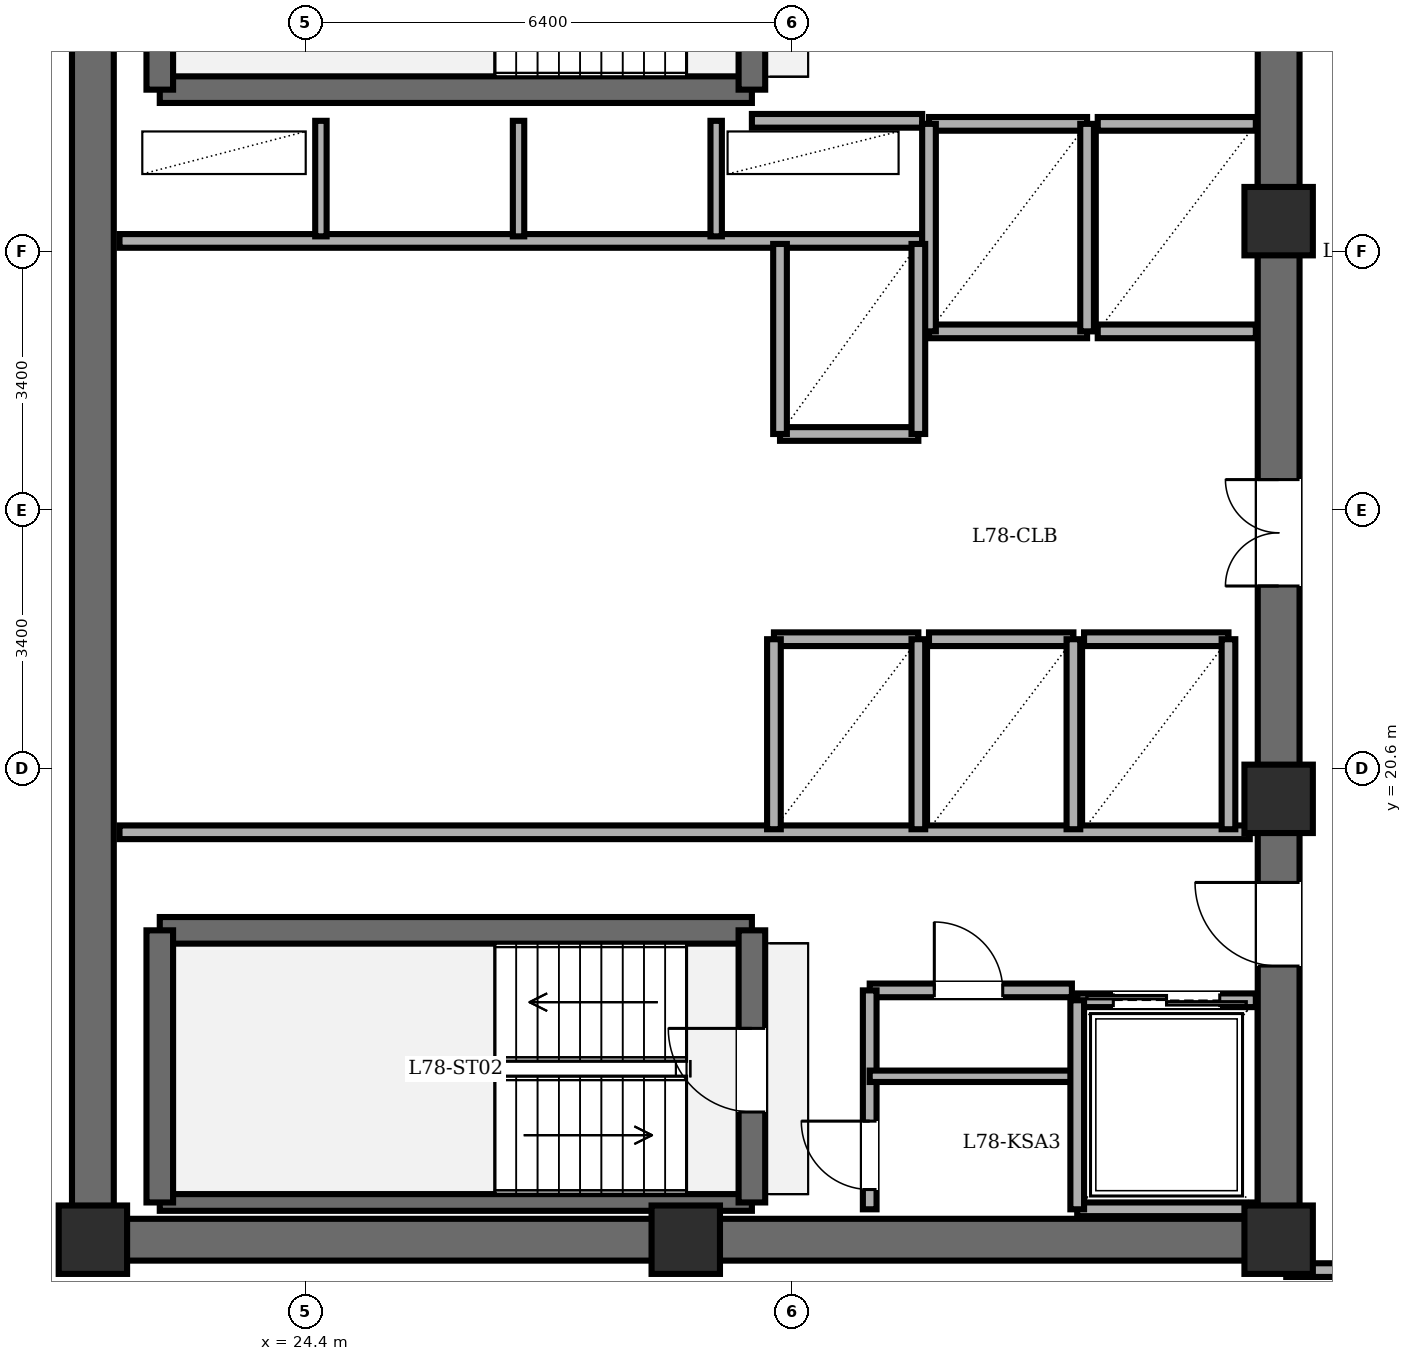
"""IFC4 building model, lengths in metres.
Left out: names, types, materials, properties, quantities, classifications, styles, units other than length and angle.
Written with IfcOpenShell. Run it as: python <this file> out.ifc"""

import sys

from ifc_helpers import new_model, si_unit, direction, frame, frame_2d, origin, origin_2d, place, context, subcontext, project, spatial, rectangle, extrude, element, fill, save


model = new_model("IFC4")
c1 = context("Model", 3, precision=1e-05, world=origin(), true_north=direction((0.0, 1.0)))
c2 = subcontext(c1, "Body", "Model", "MODEL_VIEW")
j1 = project(units=[si_unit("LENGTHUNIT", "METRE"), si_unit("PLANEANGLEUNIT", "RADIAN")], contexts=[c1])
p1 = place(None, origin())
s1 = spatial("IfcSite", under=j1, at=p1, CompositionType="ELEMENT")
p2 = place(p1, origin())
s2 = spatial("IfcBuilding", under=s1, at=p2, CompositionType="ELEMENT")
p3 = place(p2, frame((0.0, 0.0, 300.4)))
s3 = spatial("IfcBuildingStorey", under=s2, at=p3, CompositionType="ELEMENT", Elevation=300.4)
for number, where, z_axis, x_axis in (
    (1, (21.6, 14.4, 0.0), (0.0, 0.0, 1.0), (1.0, 0.0, 0.0)),
    (2, (29.4, 14.4, 0.0), (0.0, 0.0, 1.0), (1.0, 0.0, 0.0)),
    (3, (37.2, 14.4, 0.0), (0.0, 0.0, 1.0), (1.0, 0.0, 0.0)),
    (4, (37.2, 20.2, 0.0), (0.0, 0.0, 1.0), (1.0, 0.0, 0.0)),
    (5, (37.2, 27.8, 0.0), (0.0, 0.0, 1.0), (1.0, 0.0, 0.0)),
):
    element("IfcColumn", number, at=place(p3, frame(where, z_axis=z_axis, x_axis=x_axis)), inside=s3, PredefinedType="COLUMN", context=c2, shape_type="SweptSolid", body=[
        extrude(rectangle(XDim=0.9, YDim=0.9, at=origin_2d()), origin(), (0.0, 0.0, 1.0), 7.6),
    ])
p4 = place(p3, frame((21.6, 14.4, 0.0), z_axis=(0.0, 0.0, 1.0), x_axis=(0.0, 1.0, 0.0)))
e6 = element("IfcWall", 6, at=p4, inside=s3, PredefinedType="SHEAR", context=c2, shape_type="SweptSolid", body=[
    extrude(rectangle(XDim=19.2, YDim=0.55, at=frame_2d((9.6, 0.0))), origin(), (0.0, 0.0, 1.0), 7.38),
])
p5 = place(p3, frame((37.2, 14.4, 0.0), z_axis=(0.0, 0.0, 1.0), x_axis=(-1.0, 0.0, 0.0)))
e7 = element("IfcWall", 7, at=p5, inside=s3, PredefinedType="SHEAR", context=c2, shape_type="SweptSolid", body=[
    extrude(rectangle(XDim=15.6, YDim=0.55, at=frame_2d((7.8, 0.0))), origin(), (0.0, 0.0, 1.0), 7.38),
])
p6 = place(p3, frame((37.2, 14.4, 0.0), z_axis=(0.0, 0.0, 1.0), x_axis=(0.0, 1.0, 0.0)))
e8 = element("IfcWall", 8, at=p6, inside=s3, PredefinedType="SHEAR", context=c2, shape_type="SweptSolid", body=[
    extrude(rectangle(XDim=19.2, YDim=0.55, at=frame_2d((9.6, 0.0))), origin(), (0.0, 0.0, 1.0), 7.38),
])
p7 = place(p6, frame((15.8, 0.0, 0.0)))
e9 = element("IfcOpeningElement", 9, at=p7, cuts=e8, PredefinedType="OPENING", context=c2, shape_type="SweptSolid", body=[
    extrude(rectangle(XDim=1.15, YDim=2.15, at=frame_2d((0.575, 1.075))), frame((0.0, 0.285, 0.0), z_axis=(0.0, -1.0, 0.0), x_axis=(1.0, 0.0, 0.0)), (0.0, 0.0, 1.0), 0.57),
])
p8 = place(p6, frame((3.6, 0.0, 0.0)))
e10 = element("IfcOpeningElement", 10, at=p8, cuts=e8, PredefinedType="OPENING", context=c2, shape_type="SweptSolid", body=[
    extrude(rectangle(XDim=1.1, YDim=2.15, at=frame_2d((0.55, 1.075))), frame((0.0, 0.285, 0.0), z_axis=(0.0, -1.0, 0.0), x_axis=(1.0, 0.0, 0.0)), (0.0, 0.0, 1.0), 0.57),
])
p9 = place(p6, frame((8.6, 0.0, 0.0)))
e11 = element("IfcOpeningElement", 11, at=p9, cuts=e8, PredefinedType="OPENING", context=c2, shape_type="SweptSolid", body=[
    extrude(rectangle(XDim=1.4, YDim=2.25, at=frame_2d((0.7, 1.125))), frame((0.0, 0.285, 0.0), z_axis=(0.0, -1.0, 0.0), x_axis=(1.0, 0.0, 0.0)), (0.0, 0.0, 1.0), 0.57),
])
p10 = place(p3, frame((22.48, 29.53, 0.0), z_axis=(0.0, 0.0, 1.0), x_axis=(1.0, 0.0, 0.0)))
e12 = element("IfcWall", 12, at=p10, inside=s3, PredefinedType="SOLIDWALL", context=c2, shape_type="SweptSolid", body=[
    extrude(rectangle(XDim=7.79, YDim=0.35, at=frame_2d((3.895, 0.0))), origin(), (0.0, 0.0, 1.0), 7.38),
])
p11 = place(p3, frame((22.48, 29.53, 0.0), z_axis=(0.0, 0.0, 1.0), x_axis=(0.0, 1.0, 0.0)))
e13 = element("IfcWall", 13, at=p11, inside=s3, PredefinedType="SOLIDWALL", context=c2, shape_type="SweptSolid", body=[
    extrude(rectangle(XDim=3.58, YDim=0.35, at=frame_2d((1.79, 0.0))), origin(), (0.0, 0.0, 1.0), 7.38),
])
p12 = place(p3, frame((30.27, 29.53, 0.0), z_axis=(0.0, 0.0, 1.0), x_axis=(0.0, 1.0, 0.0)))
e14 = element("IfcWall", 14, at=p12, inside=s3, PredefinedType="SOLIDWALL", context=c2, shape_type="SweptSolid", body=[
    extrude(rectangle(XDim=3.58, YDim=0.35, at=frame_2d((1.79, 0.0))), origin(), (0.0, 0.0, 1.0), 7.38),
])
p13 = place(p12, frame((1.25, 0.0, 0.0)))
e15 = element("IfcOpeningElement", 15, at=p13, cuts=e14, PredefinedType="OPENING", context=c2, shape_type="SweptSolid", body=[
    extrude(rectangle(XDim=1.1, YDim=2.15, at=frame_2d((0.55, 1.075))), frame((0.0, 0.185, 0.0), z_axis=(0.0, -1.0, 0.0), x_axis=(1.0, 0.0, 0.0)), (0.0, 0.0, 1.0), 0.37),
])
p14 = place(p3, frame((22.48, 18.47, 0.0), z_axis=(0.0, 0.0, 1.0), x_axis=(1.0, 0.0, 0.0)))
e16 = element("IfcWall", 16, at=p14, inside=s3, PredefinedType="SOLIDWALL", context=c2, shape_type="SweptSolid", body=[
    extrude(rectangle(XDim=7.79, YDim=0.35, at=frame_2d((3.895, 0.0))), origin(), (0.0, 0.0, 1.0), 7.38),
])
p15 = place(p3, frame((22.48, 14.89, 0.0), z_axis=(0.0, 0.0, 1.0), x_axis=(1.0, 0.0, 0.0)))
e17 = element("IfcWall", 17, at=p15, inside=s3, PredefinedType="PARTITIONING", context=c2, shape_type="SweptSolid", body=[
    extrude(rectangle(XDim=7.79, YDim=0.22, at=frame_2d((3.895, 0.0))), origin(), (0.0, 0.0, 1.0), 7.38),
])
p16 = place(p3, frame((22.48, 14.89, 0.0), z_axis=(0.0, 0.0, 1.0), x_axis=(0.0, 1.0, 0.0)))
e18 = element("IfcWall", 18, at=p16, inside=s3, PredefinedType="SOLIDWALL", context=c2, shape_type="SweptSolid", body=[
    extrude(rectangle(XDim=3.58, YDim=0.35, at=frame_2d((1.79, 0.0))), origin(), (0.0, 0.0, 1.0), 7.38),
])
p17 = place(p3, frame((30.27, 14.89, 0.0), z_axis=(0.0, 0.0, 1.0), x_axis=(0.0, 1.0, 0.0)))
e19 = element("IfcWall", 19, at=p17, inside=s3, PredefinedType="SOLIDWALL", context=c2, shape_type="SweptSolid", body=[
    extrude(rectangle(XDim=3.58, YDim=0.35, at=frame_2d((1.79, 0.0))), origin(), (0.0, 0.0, 1.0), 7.38),
])
p18 = place(p17, frame((1.19, 0.0, 0.0)))
e20 = element("IfcOpeningElement", 20, at=p18, cuts=e19, PredefinedType="OPENING", context=c2, shape_type="SweptSolid", body=[
    extrude(rectangle(XDim=1.1, YDim=2.15, at=frame_2d((0.55, 1.075))), frame((0.0, 0.185, 0.0), z_axis=(0.0, -1.0, 0.0), x_axis=(1.0, 0.0, 0.0)), (0.0, 0.0, 1.0), 0.37),
])
p19 = place(p3, frame((30.27, 29.12, 0.0), z_axis=(0.0, 0.0, 1.0), x_axis=(1.0, 0.0, 0.0)))
e21 = element("IfcWall", 21, at=p19, inside=s3, PredefinedType="PARTITIONING", context=c2, shape_type="SweptSolid", body=[
    extrude(rectangle(XDim=2.24, YDim=0.18, at=frame_2d((1.12, 0.0))), origin(), (0.0, 0.0, 1.0), 7.38),
])
p20 = place(p3, frame((21.95, 27.54, 0.0), z_axis=(0.0, 0.0, 1.0), x_axis=(1.0, 0.0, 0.0)))
e22 = element("IfcWall", 22, at=p20, inside=s3, PredefinedType="PARTITIONING", context=c2, shape_type="SweptSolid", body=[
    extrude(rectangle(XDim=10.56, YDim=0.18, at=frame_2d((5.28, 0.0))), origin(), (0.0, 0.0, 1.0), 7.38),
])
for number, where, z_axis, x_axis in (
    (23, (24.6, 27.6, 0.0), (0.0, 0.0, 1.0), (0.0, 1.0, 0.0)),
    (24, (27.2, 27.6, 0.0), (0.0, 0.0, 1.0), (0.0, 1.0, 0.0)),
    (25, (29.8, 27.6, 0.0), (0.0, 0.0, 1.0), (0.0, 1.0, 0.0)),
):
    element("IfcWall", number, at=place(p3, frame(where, z_axis=z_axis, x_axis=x_axis)), inside=s3, PredefinedType="PARTITIONING", context=c2, shape_type="SweptSolid", body=[
        extrude(rectangle(XDim=1.52, YDim=0.15, at=frame_2d((0.76, 0.0))), origin(), (0.0, 0.0, 1.0), 7.38),
    ])
p21 = place(p3, frame((21.95, 19.76, 0.0), z_axis=(0.0, 0.0, 1.0), x_axis=(1.0, 0.0, 0.0)))
e26 = element("IfcWall", 26, at=p21, inside=s3, PredefinedType="PARTITIONING", context=c2, shape_type="SweptSolid", body=[
    extrude(rectangle(XDim=14.87, YDim=0.18, at=frame_2d((7.435, 0.0))), origin(), (0.0, 0.0, 1.0), 7.38),
])
p22 = place(p3, frame((31.82, 17.68, 0.0), z_axis=(0.0, 0.0, 1.0), x_axis=(1.0, 0.0, 0.0)))
e27 = element("IfcWall", 27, at=p22, inside=s3, PredefinedType="PARTITIONING", context=c2, shape_type="SweptSolid", body=[
    extrude(rectangle(XDim=2.66, YDim=0.18, at=frame_2d((1.33, 0.0))), origin(), (0.0, 0.0, 1.0), 7.38),
])
p23 = place(p22, frame((0.85, 0.0, 0.0)))
e28 = element("IfcOpeningElement", 28, at=p23, cuts=e27, PredefinedType="OPENING", context=c2, shape_type="SweptSolid", body=[
    extrude(rectangle(XDim=0.9, YDim=2.05, at=frame_2d((0.45, 1.025))), frame((0.0, 0.1, 0.0), z_axis=(0.0, -1.0, 0.0), x_axis=(1.0, 0.0, 0.0)), (0.0, 0.0, 1.0), 0.2),
])
p24 = place(p3, frame((31.82, 14.8, 0.0), z_axis=(0.0, 0.0, 1.0), x_axis=(0.0, 1.0, 0.0)))
e29 = element("IfcWall", 29, at=p24, inside=s3, PredefinedType="PARTITIONING", context=c2, shape_type="SweptSolid", body=[
    extrude(rectangle(XDim=2.88, YDim=0.18, at=frame_2d((1.44, 0.0))), origin(), (0.0, 0.0, 1.0), 7.38),
])
p25 = place(p24, frame((0.26, 0.0, 0.0)))
e30 = element("IfcOpeningElement", 30, at=p25, cuts=e29, PredefinedType="OPENING", context=c2, shape_type="SweptSolid", body=[
    extrude(rectangle(XDim=0.9, YDim=2.05, at=frame_2d((0.45, 1.025))), frame((0.0, 0.1, 0.0), z_axis=(0.0, -1.0, 0.0), x_axis=(1.0, 0.0, 0.0)), (0.0, 0.0, 1.0), 0.2),
])
p26 = place(p3, frame((31.82, 16.55, 0.0), z_axis=(0.0, 0.0, 1.0), x_axis=(1.0, 0.0, 0.0)))
e31 = element("IfcWall", 31, at=p26, inside=s3, PredefinedType="PARTITIONING", context=c2, shape_type="SweptSolid", body=[
    extrude(rectangle(XDim=2.66, YDim=0.15, at=frame_2d((1.33, 0.0))), origin(), (0.0, 0.0, 1.0), 7.38),
])
for number, where, z_axis, x_axis in (
    (32, (32.6, 29.08, 0.0), (0.0, 0.0, 1.0), (1.0, 0.0, 0.0)),
    (33, (34.68, 26.35, 0.0), (0.0, 0.0, 1.0), (-1.0, 0.0, 0.0)),
):
    element("IfcWall", number, at=place(p3, frame(where, z_axis=z_axis, x_axis=x_axis)), inside=s3, PredefinedType="PARTITIONING", context=c2, shape_type="SweptSolid", body=[
        extrude(rectangle(XDim=2.08, YDim=0.18, at=frame_2d((1.04, 0.0))), origin(), (0.0, 0.0, 1.0), 7.38),
    ])
for number, where, z_axis, x_axis in (
    (34, (34.68, 26.35, 0.0), (0.0, 0.0, 1.0), (0.0, 1.0, 0.0)),
    (35, (32.6, 29.08, 0.0), (0.0, 0.0, 1.0), (0.0, -1.0, 0.0)),
):
    element("IfcWall", number, at=place(p3, frame(where, z_axis=z_axis, x_axis=x_axis)), inside=s3, PredefinedType="PARTITIONING", context=c2, shape_type="SweptSolid", body=[
        extrude(rectangle(XDim=2.73, YDim=0.18, at=frame_2d((1.365, 0.0))), origin(), (0.0, 0.0, 1.0), 7.38),
    ])
for number, where, z_axis, x_axis in (
    (36, (34.82, 29.08, 0.0), (0.0, 0.0, 1.0), (1.0, 0.0, 0.0)),
    (37, (36.9, 26.35, 0.0), (0.0, 0.0, 1.0), (-1.0, 0.0, 0.0)),
):
    element("IfcWall", number, at=place(p3, frame(where, z_axis=z_axis, x_axis=x_axis)), inside=s3, PredefinedType="PARTITIONING", context=c2, shape_type="SweptSolid", body=[
        extrude(rectangle(XDim=2.08, YDim=0.18, at=frame_2d((1.04, 0.0))), origin(), (0.0, 0.0, 1.0), 7.38),
    ])
p27 = place(p3, frame((34.55, 17.55, 0.0), z_axis=(0.0, 0.0, 1.0), x_axis=(1.0, 0.0, 0.0)))
e38 = element("IfcWall", 38, at=p27, inside=s3, PredefinedType="PARTITIONING", context=c2, shape_type="SweptSolid", body=[
    extrude(rectangle(XDim=2.35, YDim=0.18, at=frame_2d((1.175, 0.0))), origin(), (0.0, 0.0, 1.0), 7.38),
])
p28 = place(p27, frame((0.475, 0.0, 0.0)))
e39 = element("IfcOpeningElement", 39, at=p28, cuts=e38, PredefinedType="OPENING", context=c2, shape_type="SweptSolid", body=[
    extrude(rectangle(XDim=1.4, YDim=2.3, at=frame_2d((0.7, 1.15))), frame((0.0, 0.1, 0.0), z_axis=(0.0, -1.0, 0.0), x_axis=(1.0, 0.0, 0.0)), (0.0, 0.0, 1.0), 0.2),
])
p29 = place(p3, frame((36.9, 14.8, 0.0), z_axis=(0.0, 0.0, 1.0), x_axis=(-1.0, 0.0, 0.0)))
e40 = element("IfcWall", 40, at=p29, inside=s3, PredefinedType="PARTITIONING", context=c2, shape_type="SweptSolid", body=[
    extrude(rectangle(XDim=2.35, YDim=0.18, at=frame_2d((1.175, 0.0))), origin(), (0.0, 0.0, 1.0), 7.38),
])
p30 = place(p3, frame((34.55, 17.55, 0.0), z_axis=(0.0, 0.0, 1.0), x_axis=(0.0, -1.0, 0.0)))
e41 = element("IfcWall", 41, at=p30, inside=s3, PredefinedType="PARTITIONING", context=c2, shape_type="SweptSolid", body=[
    extrude(rectangle(XDim=2.75, YDim=0.18, at=frame_2d((1.375, 0.0))), origin(), (0.0, 0.0, 1.0), 7.38),
])
p31 = place(p3, frame((32.46, 25.0, 0.0), z_axis=(0.0, 0.0, 1.0), x_axis=(-1.0, 0.0, 0.0)))
e42 = element("IfcWall", 42, at=p31, inside=s3, PredefinedType="PARTITIONING", context=c2, shape_type="SweptSolid", body=[
    extrude(rectangle(XDim=1.82, YDim=0.18, at=frame_2d((0.91, 0.0))), origin(), (0.0, 0.0, 1.0), 7.38),
])
for number, where, z_axis, x_axis in (
    (43, (32.46, 25.0, 0.0), (0.0, 0.0, 1.0), (0.0, 1.0, 0.0)),
    (44, (30.64, 27.5, 0.0), (0.0, 0.0, 1.0), (0.0, -1.0, 0.0)),
):
    element("IfcWall", number, at=place(p3, frame(where, z_axis=z_axis, x_axis=x_axis)), inside=s3, PredefinedType="PARTITIONING", context=c2, shape_type="SweptSolid", body=[
        extrude(rectangle(XDim=2.5, YDim=0.18, at=frame_2d((1.25, 0.0))), origin(), (0.0, 0.0, 1.0), 7.38),
    ])
p32 = place(p3, frame((30.56, 22.3, 0.0), z_axis=(0.0, 0.0, 1.0), x_axis=(1.0, 0.0, 0.0)))
e45 = element("IfcWall", 45, at=p32, inside=s3, PredefinedType="PARTITIONING", context=c2, shape_type="SweptSolid", body=[
    extrude(rectangle(XDim=1.9, YDim=0.18, at=frame_2d((0.95, 0.0))), origin(), (0.0, 0.0, 1.0), 7.38),
])
for number, where, z_axis, x_axis in (
    (46, (32.46, 19.8, 0.0), (0.0, 0.0, 1.0), (0.0, 1.0, 0.0)),
    (47, (30.56, 22.3, 0.0), (0.0, 0.0, 1.0), (0.0, -1.0, 0.0)),
):
    element("IfcWall", number, at=place(p3, frame(where, z_axis=z_axis, x_axis=x_axis)), inside=s3, PredefinedType="PARTITIONING", context=c2, shape_type="SweptSolid", body=[
        extrude(rectangle(XDim=2.5, YDim=0.18, at=frame_2d((1.25, 0.0))), origin(), (0.0, 0.0, 1.0), 7.38),
    ])
p33 = place(p3, frame((32.6, 22.3, 0.0), z_axis=(0.0, 0.0, 1.0), x_axis=(1.0, 0.0, 0.0)))
e48 = element("IfcWall", 48, at=p33, inside=s3, PredefinedType="PARTITIONING", context=c2, shape_type="SweptSolid", body=[
    extrude(rectangle(XDim=1.9, YDim=0.18, at=frame_2d((0.95, 0.0))), origin(), (0.0, 0.0, 1.0), 7.38),
])
p34 = place(p3, frame((34.5, 19.8, 0.0), z_axis=(0.0, 0.0, 1.0), x_axis=(0.0, 1.0, 0.0)))
e49 = element("IfcWall", 49, at=p34, inside=s3, PredefinedType="PARTITIONING", context=c2, shape_type="SweptSolid", body=[
    extrude(rectangle(XDim=2.5, YDim=0.18, at=frame_2d((1.25, 0.0))), origin(), (0.0, 0.0, 1.0), 7.38),
])
p35 = place(p3, frame((34.64, 22.3, 0.0), z_axis=(0.0, 0.0, 1.0), x_axis=(1.0, 0.0, 0.0)))
e50 = element("IfcWall", 50, at=p35, inside=s3, PredefinedType="PARTITIONING", context=c2, shape_type="SweptSolid", body=[
    extrude(rectangle(XDim=1.9, YDim=0.18, at=frame_2d((0.95, 0.0))), origin(), (0.0, 0.0, 1.0), 7.38),
])
p36 = place(p3, frame((36.54, 19.8, 0.0), z_axis=(0.0, 0.0, 1.0), x_axis=(0.0, 1.0, 0.0)))
e51 = element("IfcWall", 51, at=p36, inside=s3, PredefinedType="PARTITIONING", context=c2, shape_type="SweptSolid", body=[
    extrude(rectangle(XDim=2.5, YDim=0.18, at=frame_2d((1.25, 0.0))), origin(), (0.0, 0.0, 1.0), 7.38),
])
p37 = place(p3, frame((37.3, 14.0, 0.0), z_axis=(0.0, 0.0, 1.0), x_axis=(1.0, 0.0, 0.0)))
e52 = element("IfcWall", 52, at=p37, inside=s3, PredefinedType="PARTITIONING", context=c2, shape_type="SweptSolid", body=[
    extrude(rectangle(XDim=2.1, YDim=0.18, at=frame_2d((1.05, 0.0))), origin(), (0.0, 0.0, 1.0), 7.38),
])
p38 = place(p18, origin())
e53 = element("IfcDoor", 53, at=p38, inside=s3, OperationType="SINGLE_SWING_RIGHT", PredefinedType="DOOR", context=c2, shape_type="SweptSolid", body=[
    extrude(rectangle(XDim=1.1, YDim=2.15, at=frame_2d((0.55, 1.075))), frame((0.0, 0.025, 0.0), z_axis=(0.0, -1.0, 0.0), x_axis=(1.0, 0.0, 0.0)), (0.0, 0.0, 1.0), 0.05),
])
fill(e20, e53)
p39 = place(p8, origin())
e54 = element("IfcDoor", 54, at=p39, inside=s3, OperationType="SINGLE_SWING_RIGHT", PredefinedType="DOOR", context=c2, shape_type="SweptSolid", body=[
    extrude(rectangle(XDim=1.1, YDim=2.15, at=frame_2d((0.55, 1.075))), frame((0.0, 0.025, 0.0), z_axis=(0.0, -1.0, 0.0), x_axis=(1.0, 0.0, 0.0)), (0.0, 0.0, 1.0), 0.05),
])
fill(e10, e54)
p40 = place(p23, origin())
e55 = element("IfcDoor", 55, at=p40, inside=s3, OperationType="SINGLE_SWING_LEFT", PredefinedType="DOOR", context=c2, shape_type="SweptSolid", body=[
    extrude(rectangle(XDim=0.9, YDim=2.05, at=frame_2d((0.45, 1.025))), frame((0.0, 0.025, 0.0), z_axis=(0.0, -1.0, 0.0), x_axis=(1.0, 0.0, 0.0)), (0.0, 0.0, 1.0), 0.05),
])
fill(e28, e55)
p41 = place(p25, origin())
e56 = element("IfcDoor", 56, at=p41, inside=s3, OperationType="SINGLE_SWING_RIGHT", PredefinedType="DOOR", context=c2, shape_type="SweptSolid", body=[
    extrude(rectangle(XDim=0.9, YDim=2.05, at=frame_2d((0.45, 1.025))), frame((0.0, 0.025, 0.0), z_axis=(0.0, -1.0, 0.0), x_axis=(1.0, 0.0, 0.0)), (0.0, 0.0, 1.0), 0.05),
])
fill(e30, e56)
p42 = place(p28, origin())
e57 = element("IfcDoor", 57, at=p42, inside=s3, OperationType="DOUBLE_DOOR_SLIDING", PredefinedType="DOOR", context=c2, shape_type="SweptSolid", body=[
    extrude(rectangle(XDim=1.4, YDim=2.3, at=frame_2d((0.7, 1.15))), frame((0.0, 0.025, 0.0), z_axis=(0.0, -1.0, 0.0), x_axis=(1.0, 0.0, 0.0)), (0.0, 0.0, 1.0), 0.05),
])
fill(e39, e57)
p43 = place(p9, origin())
e58 = element("IfcDoor", 58, at=p43, inside=s3, OperationType="DOUBLE_DOOR_SINGLE_SWING", PredefinedType="DOOR", context=c2, shape_type="SweptSolid", body=[
    extrude(rectangle(XDim=1.4, YDim=2.25, at=frame_2d((0.7, 1.125))), frame((0.0, 0.025, 0.0), z_axis=(0.0, -1.0, 0.0), x_axis=(1.0, 0.0, 0.0)), (0.0, 0.0, 1.0), 0.05),
])
fill(e11, e58)
save(model, sys.argv[1])
